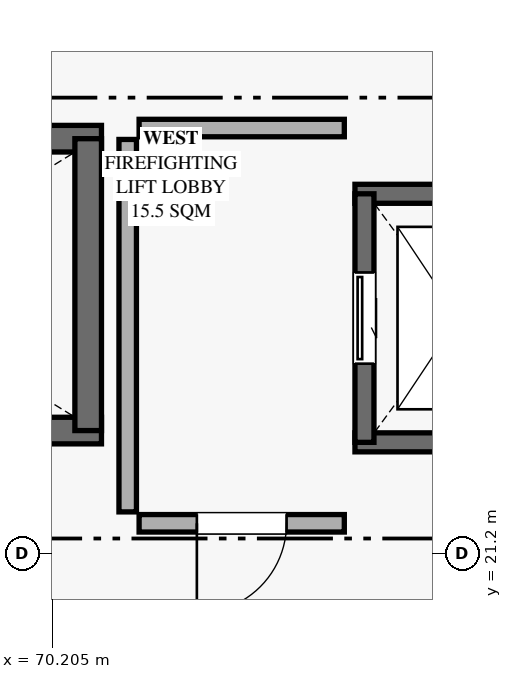
"""IFC4 building model, lengths in metres.
Left out: names, types, materials, properties, quantities, classifications, styles, units other than length and angle.
Written with IfcOpenShell. Run it as: python <this file> out.ifc"""

import sys

from ifc_helpers import new_model, si_unit, direction, frame, frame_2d, origin, place, context, subcontext, project, spatial, rectangle, extrude, element, fill, save


model = new_model("IFC4")
c1 = context("Model", 3, precision=1e-05, world=origin(), true_north=direction((0.0, 1.0)))
c2 = subcontext(c1, "Body", "Model", "MODEL_VIEW")
j1 = project(units=[si_unit("LENGTHUNIT", "METRE"), si_unit("PLANEANGLEUNIT", "RADIAN")], contexts=[c1])
p1 = place(None, origin())
s1 = spatial("IfcSite", under=j1, at=p1, CompositionType="ELEMENT")
p2 = place(p1, origin())
s2 = spatial("IfcBuilding", under=s1, at=p2, CompositionType="ELEMENT")
p3 = place(p2, frame((0.0, 0.0, 10.44)))
s3 = spatial("IfcBuildingStorey", under=s2, at=p3, CompositionType="ELEMENT", Elevation=10.44)
for number, where, z_axis, x_axis in (
    (1, (70.855, 22.82, 0.0), (0.0, 0.0, 1.0), (-1.0, 0.0, 0.0)),
    (2, (62.845, 26.66, 0.0), (0.0, 0.0, 1.0), (1.0, 0.0, 0.0)),
):
    element("IfcWall", number, at=place(p3, frame(where, z_axis=z_axis, x_axis=x_axis)), inside=s3, PredefinedType="SHEAR", context=c2, shape_type="SweptSolid", body=[
        extrude(rectangle(XDim=8.01, YDim=0.35, at=frame_2d((4.005, 0.0))), origin(), (0.0, 0.0, 1.0), 4.41),
    ])
p4 = place(p3, frame((70.68, 26.66, 0.0), z_axis=(0.0, 0.0, 1.0), x_axis=(0.0, -1.0, 0.0)))
e3 = element("IfcWall", 3, at=p4, inside=s3, PredefinedType="SHEAR", context=c2, shape_type="SweptSolid", body=[
    extrude(rectangle(XDim=3.84, YDim=0.35, at=frame_2d((1.92, 0.0))), origin(), (0.0, 0.0, 1.0), 4.41),
])
for number, where, z_axis, x_axis in (
    (4, (76.91, 22.665, 0.0), (0.0, 0.0, 1.0), (-1.0, 0.0, 0.0)),
    (5, (74.19, 25.935, 0.0), (0.0, 0.0, 1.0), (1.0, 0.0, 0.0)),
):
    element("IfcWall", number, at=place(p3, frame(where, z_axis=z_axis, x_axis=x_axis)), inside=s3, PredefinedType="SHEAR", context=c2, shape_type="SweptSolid", body=[
        extrude(rectangle(XDim=2.72, YDim=0.25, at=frame_2d((1.36, 0.0))), origin(), (0.0, 0.0, 1.0), 4.41),
    ])
p5 = place(p3, frame((74.315, 22.665, 0.0), z_axis=(0.0, 0.0, 1.0), x_axis=(0.0, 1.0, 0.0)))
e6 = element("IfcWall", 6, at=p5, inside=s3, PredefinedType="SHEAR", context=c2, shape_type="SweptSolid", body=[
    extrude(rectangle(XDim=3.27, YDim=0.25, at=frame_2d((1.635, 0.0))), origin(), (0.0, 0.0, 1.0), 4.41),
])
p6 = place(p5, frame((1.035, 0.0, 0.0)))
e7 = element("IfcOpeningElement", 7, at=p6, cuts=e6, PredefinedType="OPENING", context=c2, shape_type="SweptSolid", body=[
    extrude(rectangle(XDim=1.2, YDim=2.25, at=frame_2d((0.6, 1.125))), frame((0.0, 0.135, 0.0), z_axis=(0.0, -1.0, 0.0), x_axis=(1.0, 0.0, 0.0)), (0.0, 0.0, 1.0), 0.27),
])
p7 = place(p3, frame((74.05, 21.6, 0.0), z_axis=(0.0, 0.0, 1.0), x_axis=(-1.0, 0.0, 0.0)))
e8 = element("IfcWall", 8, at=p7, inside=s3, PredefinedType="PARTITIONING", context=c2, shape_type="SweptSolid", body=[
    extrude(rectangle(XDim=2.7, YDim=0.23, at=frame_2d((1.35, 0.0))), origin(), (0.0, 0.0, 1.0), 3.16),
])
p8 = place(p7, frame((0.76, 0.0, 0.0)))
e9 = element("IfcOpeningElement", 9, at=p8, cuts=e8, PredefinedType="OPENING", context=c2, shape_type="SweptSolid", body=[
    extrude(rectangle(XDim=1.18, YDim=2.12, at=frame_2d((0.59, 1.06))), frame((0.0, 0.125, 0.0), z_axis=(0.0, -1.0, 0.0), x_axis=(1.0, 0.0, 0.0)), (0.0, 0.0, 1.0), 0.25),
])
p9 = place(p3, frame((71.35, 26.8, 0.0), z_axis=(0.0, 0.0, 1.0), x_axis=(1.0, 0.0, 0.0)))
e10 = element("IfcWall", 10, at=p9, inside=s3, PredefinedType="PARTITIONING", context=c2, shape_type="SweptSolid", body=[
    extrude(rectangle(XDim=2.7, YDim=0.23, at=frame_2d((1.35, 0.0))), origin(), (0.0, 0.0, 1.0), 3.16),
])
p10 = place(p3, frame((71.2, 21.75, 0.0), z_axis=(0.0, 0.0, 1.0), x_axis=(0.0, 1.0, 0.0)))
e11 = element("IfcWall", 11, at=p10, inside=s3, PredefinedType="PARTITIONING", context=c2, shape_type="SweptSolid", body=[
    extrude(rectangle(XDim=4.9, YDim=0.23, at=frame_2d((2.45, 0.0))), origin(), (0.0, 0.0, 1.0), 3.16),
])
p11 = place(p6, origin())
e12 = element("IfcDoor", 12, at=p11, inside=s3, OperationType="SLIDING_TO_LEFT", PredefinedType="DOOR", context=c2, shape_type="SweptSolid", body=[
    extrude(rectangle(XDim=1.2, YDim=2.25, at=frame_2d((0.6, 1.125))), frame((0.0, 0.025, 0.0), z_axis=(0.0, -1.0, 0.0), x_axis=(1.0, 0.0, 0.0)), (0.0, 0.0, 1.0), 0.05),
])
fill(e7, e12)
p12 = place(p8, origin())
e13 = element("IfcDoor", 13, at=p12, inside=s3, OperationType="SINGLE_SWING_RIGHT", PredefinedType="DOOR", context=c2, shape_type="SweptSolid", body=[
    extrude(rectangle(XDim=1.18, YDim=2.12, at=frame_2d((0.59, 1.06))), frame((0.0, 0.025, 0.0), z_axis=(0.0, -1.0, 0.0), x_axis=(1.0, 0.0, 0.0)), (0.0, 0.0, 1.0), 0.05),
])
fill(e9, e13)
save(model, sys.argv[1])
